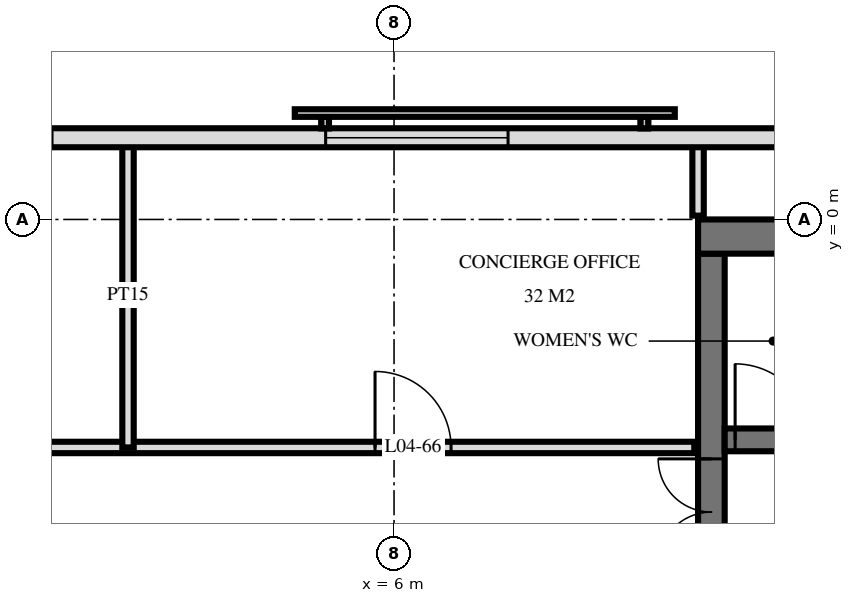
"""IFC4 building model, lengths in metres.
Left out: names, types, materials, properties, quantities, classifications, styles, units other than length and angle.
Written with IfcOpenShell. Run it as: python <this file> out.ifc"""

import sys

from ifc_helpers import new_model, si_unit, direction, frame, frame_2d, origin, place, context, subcontext, project, spatial, rectangle, extrude, element, fill, save


model = new_model("IFC4")
c1 = context("Model", 3, precision=1e-05, world=origin(), true_north=direction((0.0, 1.0)))
c2 = subcontext(c1, "Body", "Model", "MODEL_VIEW")
j1 = project(units=[si_unit("LENGTHUNIT", "METRE"), si_unit("PLANEANGLEUNIT", "RADIAN")], contexts=[c1])
p1 = place(None, origin())
s1 = spatial("IfcSite", under=j1, at=p1, CompositionType="ELEMENT")
p2 = place(p1, origin())
s2 = spatial("IfcBuilding", under=s1, at=p2, CompositionType="ELEMENT")
p3 = place(p2, frame((0.0, 0.0, 24.0)))
s3 = spatial("IfcBuildingStorey", under=s2, at=p3, CompositionType="ELEMENT", Elevation=24.0)
p4 = place(p3, frame((10.0, -0.225, 0.0), z_axis=(0.0, 0.0, 1.0), x_axis=(1.0, 0.0, 0.0)))
e1 = element("IfcWall", 1, at=p4, inside=s3, PredefinedType="SHEAR", context=c2, shape_type="SweptSolid", body=[
    extrude(rectangle(XDim=19.5, YDim=0.45, at=frame_2d((9.75, 0.0))), origin(), (0.0, 0.0, 1.0), 3.6),
])
p5 = place(p3, frame((10.175, -14.55, 0.0), z_axis=(0.0, 0.0, 1.0), x_axis=(0.0, 1.0, 0.0)))
e2 = element("IfcWall", 2, at=p5, inside=s3, PredefinedType="SHEAR", context=c2, shape_type="SweptSolid", body=[
    extrude(rectangle(XDim=14.1, YDim=0.35, at=frame_2d((7.05, 0.0))), origin(), (0.0, 0.0, 1.0), 3.6),
])
p6 = place(p5, frame((8.4, 0.0, 0.0)))
e3 = element("IfcOpeningElement", 3, at=p6, cuts=e2, PredefinedType="OPENING", context=c2, shape_type="SweptSolid", body=[
    extrude(rectangle(XDim=1.4, YDim=2.4, at=frame_2d((0.7, 1.2))), frame((0.0, 0.185, 0.0), z_axis=(0.0, -1.0, 0.0), x_axis=(1.0, 0.0, 0.0)), (0.0, 0.0, 1.0), 0.37),
])
p7 = place(p5, frame((10.0, 0.0, 0.0)))
e4 = element("IfcOpeningElement", 4, at=p7, cuts=e2, PredefinedType="OPENING", context=c2, shape_type="SweptSolid", body=[
    extrude(rectangle(XDim=1.4, YDim=2.4, at=frame_2d((0.7, 1.2))), frame((0.0, 0.185, 0.0), z_axis=(0.0, -1.0, 0.0), x_axis=(1.0, 0.0, 0.0)), (0.0, 0.0, 1.0), 0.37),
])
p8 = place(p5, frame((4.0, 0.0, 0.0)))
e5 = element("IfcOpeningElement", 5, at=p8, cuts=e2, PredefinedType="OPENING", context=c2, shape_type="SweptSolid", body=[
    extrude(rectangle(XDim=1.2, YDim=2.1, at=frame_2d((0.6, 1.05))), frame((0.0, 0.185, 0.0), z_axis=(0.0, -1.0, 0.0), x_axis=(1.0, 0.0, 0.0)), (0.0, 0.0, 1.0), 0.37),
])
p9 = place(p3, frame((10.35, -2.9, 0.0), z_axis=(0.0, 0.0, 1.0), x_axis=(1.0, 0.0, 0.0)))
e6 = element("IfcWall", 6, at=p9, inside=s3, PredefinedType="SHEAR", context=c2, shape_type="SweptSolid", body=[
    extrude(rectangle(XDim=18.7, YDim=0.3, at=frame_2d((9.35, 0.0))), origin(), (0.0, 0.0, 1.0), 3.6),
])
p10 = place(p9, frame((14.65, 0.0, 0.0)))
e7 = element("IfcOpeningElement", 7, at=p10, cuts=e6, PredefinedType="OPENING", context=c2, shape_type="SweptSolid", body=[
    extrude(rectangle(XDim=1.1, YDim=2.1, at=frame_2d((0.55, 1.05))), frame((0.0, 0.16, 0.0), z_axis=(0.0, -1.0, 0.0), x_axis=(1.0, 0.0, 0.0)), (0.0, 0.0, 1.0), 0.32),
])
p11 = place(p9, frame((17.05, 0.0, 0.0)))
e8 = element("IfcOpeningElement", 8, at=p11, cuts=e6, PredefinedType="OPENING", context=c2, shape_type="SweptSolid", body=[
    extrude(rectangle(XDim=1.1, YDim=2.1, at=frame_2d((0.55, 1.05))), frame((0.0, 0.16, 0.0), z_axis=(0.0, -1.0, 0.0), x_axis=(1.0, 0.0, 0.0)), (0.0, 0.0, 1.0), 0.32),
])
p12 = place(p9, frame((6.188, 0.0, 0.0)))
e9 = element("IfcOpeningElement", 9, at=p12, cuts=e6, PredefinedType="OPENING", context=c2, shape_type="SweptSolid", body=[
    extrude(rectangle(XDim=0.9, YDim=2.1, at=frame_2d((0.45, 1.05))), frame((0.0, 0.16, 0.0), z_axis=(0.0, -1.0, 0.0), x_axis=(1.0, 0.0, 0.0)), (0.0, 0.0, 1.0), 0.32),
])
p13 = place(p9, frame((7.613, 0.0, 0.0)))
e10 = element("IfcOpeningElement", 10, at=p13, cuts=e6, PredefinedType="OPENING", context=c2, shape_type="SweptSolid", body=[
    extrude(rectangle(XDim=0.9, YDim=2.1, at=frame_2d((0.45, 1.05))), frame((0.0, 0.16, 0.0), z_axis=(0.0, -1.0, 0.0), x_axis=(1.0, 0.0, 0.0)), (0.0, 0.0, 1.0), 0.32),
])
p14 = place(p9, frame((0.137, 0.0, 0.0)))
e11 = element("IfcOpeningElement", 11, at=p14, cuts=e6, PredefinedType="OPENING", context=c2, shape_type="SweptSolid", body=[
    extrude(rectangle(XDim=1.0, YDim=2.1, at=frame_2d((0.5, 1.05))), frame((0.0, 0.16, 0.0), z_axis=(0.0, -1.0, 0.0), x_axis=(1.0, 0.0, 0.0)), (0.0, 0.0, 1.0), 0.32),
])
p15 = place(p9, frame((1.562, 0.0, 0.0)))
e12 = element("IfcOpeningElement", 12, at=p15, cuts=e6, PredefinedType="OPENING", context=c2, shape_type="SweptSolid", body=[
    extrude(rectangle(XDim=1.0, YDim=2.1, at=frame_2d((0.5, 1.05))), frame((0.0, 0.16, 0.0), z_axis=(0.0, -1.0, 0.0), x_axis=(1.0, 0.0, 0.0)), (0.0, 0.0, 1.0), 0.32),
])
p16 = place(p9, frame((3.85, 0.0, 0.0)))
e13 = element("IfcOpeningElement", 13, at=p16, cuts=e6, PredefinedType="OPENING", context=c2, shape_type="SweptSolid", body=[
    extrude(rectangle(XDim=1.0, YDim=2.1, at=frame_2d((0.5, 1.05))), frame((0.0, 0.16, 0.0), z_axis=(0.0, -1.0, 0.0), x_axis=(1.0, 0.0, 0.0)), (0.0, 0.0, 1.0), 0.32),
])
p17 = place(p9, frame((12.1, 0.0, 0.0)))
e14 = element("IfcOpeningElement", 14, at=p17, cuts=e6, PredefinedType="OPENING", context=c2, shape_type="SweptSolid", body=[
    extrude(rectangle(XDim=1.0, YDim=2.1, at=frame_2d((0.5, 1.05))), frame((0.0, 0.16, 0.0), z_axis=(0.0, -1.0, 0.0), x_axis=(1.0, 0.0, 0.0)), (0.0, 0.0, 1.0), 0.32),
])
p18 = place(p3, frame((28.775, 1.075, 0.0), z_axis=(0.0, 0.0, 1.0), x_axis=(-1.0, 0.0, 0.0)))
e15 = element("IfcWall", 15, at=p18, inside=s3, PredefinedType="SOLIDWALL", context=c2, shape_type="SweptSolid", body=[
    extrude(rectangle(XDim=57.551, YDim=0.25, at=frame_2d((28.775, 0.0))), origin(), (0.0, 0.0, 1.0), 3.32),
])
p19 = place(p18, frame((21.275, 0.0, 0.3)))
e16 = element("IfcOpeningElement", 16, at=p19, cuts=e15, PredefinedType="OPENING", context=c2, shape_type="SweptSolid", body=[
    extrude(rectangle(XDim=2.4, YDim=2.1, at=frame_2d((1.2, 1.05))), frame((0.0, 0.135, 0.0), z_axis=(0.0, -1.0, 0.0), x_axis=(1.0, 0.0, 0.0)), (0.0, 0.0, 1.0), 0.27),
])
p20 = place(p18, frame((27.275, 0.0, 0.3)))
e17 = element("IfcOpeningElement", 17, at=p20, cuts=e15, PredefinedType="OPENING", context=c2, shape_type="SweptSolid", body=[
    extrude(rectangle(XDim=2.4, YDim=2.1, at=frame_2d((1.2, 1.05))), frame((0.0, 0.135, 0.0), z_axis=(0.0, -1.0, 0.0), x_axis=(1.0, 0.0, 0.0)), (0.0, 0.0, 1.0), 0.27),
])
p21 = place(p18, frame((30.275, 0.0, 0.3)))
e18 = element("IfcOpeningElement", 18, at=p21, cuts=e15, PredefinedType="OPENING", context=c2, shape_type="SweptSolid", body=[
    extrude(rectangle(XDim=2.4, YDim=2.1, at=frame_2d((1.2, 1.05))), frame((0.0, 0.135, 0.0), z_axis=(0.0, -1.0, 0.0), x_axis=(1.0, 0.0, 0.0)), (0.0, 0.0, 1.0), 0.27),
])
p22 = place(p3, frame((10.0, 0.05, 0.0), z_axis=(0.0, 0.0, 1.0), x_axis=(0.0, 1.0, 0.0)))
e19 = element("IfcWall", 19, at=p22, inside=s3, PredefinedType="PARTITIONING", context=c2, shape_type="SweptSolid", body=[
    extrude(rectangle(XDim=0.97, YDim=0.15, at=frame_2d((0.485, 0.0))), origin(), (0.0, 0.0, 1.0), 3.32),
])
p23 = place(p3, frame((2.5, -3.0, 0.0), z_axis=(0.0, 0.0, 1.0), x_axis=(0.0, 1.0, 0.0)))
e20 = element("IfcWall", 20, at=p23, inside=s3, PredefinedType="PARTITIONING", context=c2, shape_type="SweptSolid", body=[
    extrude(rectangle(XDim=4.02, YDim=0.15, at=frame_2d((2.01, 0.0))), origin(), (0.0, 0.0, 1.0), 3.32),
])
p24 = place(p3, frame((-9.95, -3.0, 0.0), z_axis=(0.0, 0.0, 1.0), x_axis=(1.0, 0.0, 0.0)))
e21 = element("IfcWall", 21, at=p24, inside=s3, PredefinedType="PARTITIONING", context=c2, shape_type="SweptSolid", body=[
    extrude(rectangle(XDim=19.9, YDim=0.15, at=frame_2d((9.95, 0.0))), origin(), (0.0, 0.0, 1.0), 3.32),
])
p25 = place(p24, frame((0.95, 0.0, 0.0)))
e22 = element("IfcOpeningElement", 22, at=p25, cuts=e21, PredefinedType="OPENING", context=c2, shape_type="SweptSolid", body=[
    extrude(rectangle(XDim=1.0, YDim=2.1, at=frame_2d((0.5, 1.05))), frame((0.0, 0.085, 0.0), z_axis=(0.0, -1.0, 0.0), x_axis=(1.0, 0.0, 0.0)), (0.0, 0.0, 1.0), 0.17),
])
p26 = place(p24, frame((3.7, 0.0, 0.0)))
e23 = element("IfcOpeningElement", 23, at=p26, cuts=e21, PredefinedType="OPENING", context=c2, shape_type="SweptSolid", body=[
    extrude(rectangle(XDim=1.0, YDim=2.1, at=frame_2d((0.5, 1.05))), frame((0.0, 0.085, 0.0), z_axis=(0.0, -1.0, 0.0), x_axis=(1.0, 0.0, 0.0)), (0.0, 0.0, 1.0), 0.17),
])
p27 = place(p24, frame((8.45, 0.0, 0.0)))
e24 = element("IfcOpeningElement", 24, at=p27, cuts=e21, PredefinedType="OPENING", context=c2, shape_type="SweptSolid", body=[
    extrude(rectangle(XDim=1.0, YDim=2.1, at=frame_2d((0.5, 1.05))), frame((0.0, 0.085, 0.0), z_axis=(0.0, -1.0, 0.0), x_axis=(1.0, 0.0, 0.0)), (0.0, 0.0, 1.0), 0.17),
])
p28 = place(p24, frame((15.7, 0.0, 0.0)))
e25 = element("IfcOpeningElement", 25, at=p28, cuts=e21, PredefinedType="OPENING", context=c2, shape_type="SweptSolid", body=[
    extrude(rectangle(XDim=1.0, YDim=2.1, at=frame_2d((0.5, 1.05))), frame((0.0, 0.085, 0.0), z_axis=(0.0, -1.0, 0.0), x_axis=(1.0, 0.0, 0.0)), (0.0, 0.0, 1.0), 0.17),
])
p29 = place(p19, origin())
e26 = element("IfcWindow", 26, at=p29, inside=s3, PartitioningType="SINGLE_PANEL", PredefinedType="WINDOW", context=c2, shape_type="SweptSolid", body=[
    extrude(rectangle(XDim=2.4, YDim=2.1, at=frame_2d((1.2, 1.05))), frame((0.0, 0.03, 0.0), z_axis=(0.0, -1.0, 0.0), x_axis=(1.0, 0.0, 0.0)), (0.0, 0.0, 1.0), 0.06),
])
fill(e16, e26)
p30 = place(p7, origin())
e27 = element("IfcDoor", 27, at=p30, inside=s3, OperationType="DOUBLE_DOOR_SINGLE_SWING", PredefinedType="DOOR", context=c2, shape_type="SweptSolid", body=[
    extrude(rectangle(XDim=1.4, YDim=2.4, at=frame_2d((0.7, 1.2))), frame((0.0, 0.025, 0.0), z_axis=(0.0, -1.0, 0.0), x_axis=(1.0, 0.0, 0.0)), (0.0, 0.0, 1.0), 0.05),
])
fill(e4, e27)
p31 = place(p14, origin())
e28 = element("IfcDoor", 28, at=p31, inside=s3, OperationType="SINGLE_SWING_RIGHT", PredefinedType="DOOR", context=c2, shape_type="SweptSolid", body=[
    extrude(rectangle(XDim=1.0, YDim=2.1, at=frame_2d((0.5, 1.05))), frame((0.0, 0.025, 0.0), z_axis=(0.0, -1.0, 0.0), x_axis=(1.0, 0.0, 0.0)), (0.0, 0.0, 1.0), 0.05),
])
fill(e11, e28)
p32 = place(p28, origin())
e29 = element("IfcDoor", 29, at=p32, inside=s3, OperationType="SINGLE_SWING_RIGHT", PredefinedType="DOOR", context=c2, shape_type="SweptSolid", body=[
    extrude(rectangle(XDim=1.0, YDim=2.1, at=frame_2d((0.5, 1.05))), frame((0.0, 0.025, 0.0), z_axis=(0.0, -1.0, 0.0), x_axis=(1.0, 0.0, 0.0)), (0.0, 0.0, 1.0), 0.05),
])
fill(e25, e29)
save(model, sys.argv[1])
